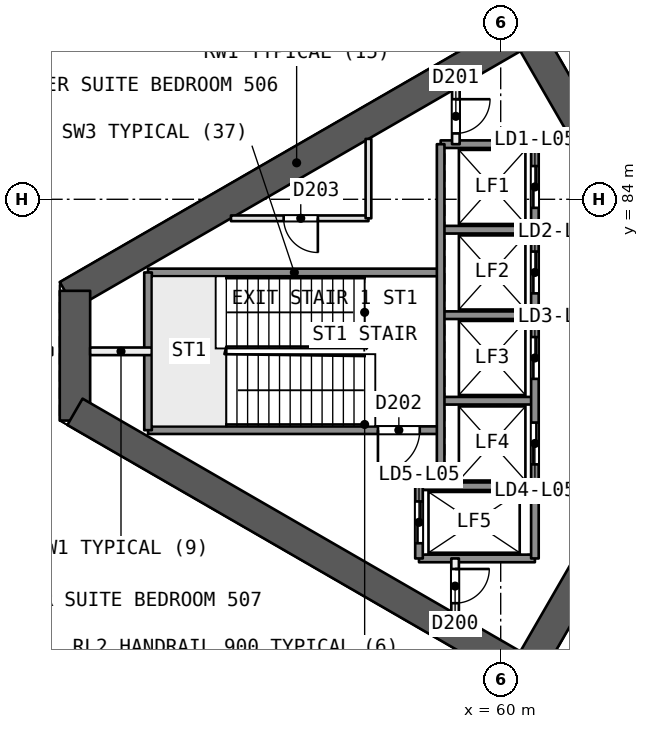
"""IFC4 building model, lengths in metres.
Left out: names, types, materials, properties, quantities, classifications, styles, units other than length and angle.
Written with IfcOpenShell. Run it as: python <this file> out.ifc"""

import sys

from ifc_helpers import new_model, si_unit, direction, frame, frame_2d, origin, place, context, subcontext, project, spatial, rectangle, extrude, element, fill, save


model = new_model("IFC4")
c1 = context("Model", 3, precision=1e-05, world=origin(), true_north=direction((0.0, 1.0)))
c2 = subcontext(c1, "Body", "Model", "MODEL_VIEW")
j1 = project(units=[si_unit("LENGTHUNIT", "METRE"), si_unit("PLANEANGLEUNIT", "RADIAN")], contexts=[c1])
p1 = place(None, origin())
s1 = spatial("IfcSite", under=j1, at=p1, CompositionType="ELEMENT")
p2 = place(p1, origin())
s2 = spatial("IfcBuilding", under=s1, at=p2, CompositionType="ELEMENT")
p3 = place(p2, frame((0.0, 0.0, 30.0)))
s3 = spatial("IfcBuildingStorey", under=s2, at=p3, CompositionType="ELEMENT", Elevation=30.0)
p4 = place(p3, frame((65.538, 80.0, 0.0), z_axis=(0.0, 0.0, 1.0), x_axis=(-0.49999662545, 0.866027352073, 0.0)))
e1 = element("IfcWall", 1, at=p4, inside=s3, PredefinedType="SHEAR", context=c2, shape_type="SweptSolid", body=[
    extrude(rectangle(XDim=10.149, YDim=0.8, at=frame_2d((5.074, 0.0))), origin(), (0.0, 0.0, 1.0), 3.7),
])
p5 = place(p4, frame((0.719, 0.0, 0.0)))
e2 = element("IfcOpeningElement", 2, at=p5, cuts=e1, PredefinedType="OPENING", context=c2, shape_type="SweptSolid", body=[
    extrude(rectangle(XDim=1.2, YDim=2.1, at=frame_2d((0.6, 1.05))), frame((0.0, 0.411, 0.0), z_axis=(0.0, -1.0, 0.0), x_axis=(1.0, 0.0, 0.0)), (0.0, 0.0, 1.0), 0.821),
])
p6 = place(p3, frame((60.664, 88.443, 0.0), z_axis=(0.0, 0.0, 1.0), x_axis=(-0.866029478545, -0.499992942241, 0.0)))
e3 = element("IfcWall", 3, at=p6, inside=s3, PredefinedType="SHEAR", context=c2, shape_type="SweptSolid", body=[
    extrude(rectangle(XDim=13.933, YDim=0.8, at=frame_2d((6.967, 0.0))), origin(), (0.0, 0.0, 1.0), 3.7),
])
p7 = place(p3, frame((48.797, 81.592, 0.0), z_axis=(0.0, 0.0, 1.0), x_axis=(0.0, -1.0, 0.0)))
e4 = element("IfcWall", 4, at=p7, inside=s3, PredefinedType="SHEAR", context=c2, shape_type="SweptSolid", body=[
    extrude(rectangle(XDim=3.415, YDim=0.8, at=frame_2d((1.707, 0.0))), origin(), (0.0, 0.0, 1.0), 3.7),
])
p8 = place(p3, frame((48.797, 78.408, 0.0), z_axis=(0.0, 0.0, 1.0), x_axis=(0.866032504327, -0.499987701298, 0.0)))
e5 = element("IfcWall", 5, at=p8, inside=s3, PredefinedType="SHEAR", context=c2, shape_type="SweptSolid", body=[
    extrude(rectangle(XDim=14.102, YDim=0.8, at=frame_2d((7.051, 0.0))), origin(), (0.0, 0.0, 1.0), 3.7),
])
p9 = place(p3, frame((60.664, 71.557, 0.0), z_axis=(0.0, 0.0, 1.0), x_axis=(0.50000409368, 0.866023040284, 0.0)))
e6 = element("IfcWall", 6, at=p9, inside=s3, PredefinedType="SHEAR", context=c2, shape_type="SweptSolid", body=[
    extrude(rectangle(XDim=9.98, YDim=0.8, at=frame_2d((4.99, 0.0))), origin(), (0.0, 0.0, 1.0), 3.7),
])
p10 = place(p9, frame((7.83, 0.0, 0.0)))
e7 = element("IfcOpeningElement", 7, at=p10, cuts=e6, PredefinedType="OPENING", context=c2, shape_type="SweptSolid", body=[
    extrude(rectangle(XDim=1.2, YDim=2.1, at=frame_2d((0.6, 1.05))), frame((0.0, 0.411, 0.0), z_axis=(0.0, -1.0, 0.0), x_axis=(1.0, 0.0, 0.0)), (0.0, 0.0, 1.0), 0.821),
])
p11 = place(p3, frame((61.625, 96.932, 0.0), z_axis=(0.0, 0.0, 1.0), x_axis=(0.499997291418, -0.866026967579, 0.0)))
e8 = element("IfcWall", 8, at=p11, inside=s3, PredefinedType="PARTITIONING", context=c2, shape_type="SweptSolid", body=[
    extrude(rectangle(XDim=14.251, YDim=0.2, at=frame_2d((7.125, 0.0))), origin(), (0.0, 0.0, 1.0), 3.2),
])
p12 = place(p3, frame((37.628, 80.0, 0.0), z_axis=(0.0, 0.0, 1.0), x_axis=(1.0, 0.0, 0.0)))
e9 = element("IfcWall", 9, at=p12, inside=s3, PredefinedType="PARTITIONING", context=c2, shape_type="SweptSolid", body=[
    extrude(rectangle(XDim=10.57, YDim=0.2, at=frame_2d((5.285, 0.0))), origin(), (0.0, 0.0, 1.0), 3.2),
])
p13 = place(p3, frame((61.625, 63.068, 0.0), z_axis=(0.0, 0.0, 1.0), x_axis=(0.499997291418, 0.866026967579, 0.0)))
e10 = element("IfcWall", 10, at=p13, inside=s3, PredefinedType="PARTITIONING", context=c2, shape_type="SweptSolid", body=[
    extrude(rectangle(XDim=14.251, YDim=0.2, at=frame_2d((7.125, 0.0))), origin(), (0.0, 0.0, 1.0), 3.2),
])
p14 = place(p3, frame((37.479, 83.163, 0.0), z_axis=(0.0, 0.0, 1.0), x_axis=(0.866024340432, 0.500001841776, 0.0)))
e11 = element("IfcWall", 11, at=p14, inside=s3, PredefinedType="SOLIDWALL", context=c2, shape_type="SweptSolid", body=[
    extrude(rectangle(XDim=61.824, YDim=0.3, at=frame_2d((30.912, 0.0))), origin(), (0.0, 0.0, 1.0), 3.2),
])
p15 = place(p14, frame((29.556, 0.0, 0.0)))
e12 = element("IfcOpeningElement", 12, at=p15, cuts=e11, PredefinedType="OPENING", context=c2, shape_type="SweptSolid", body=[
    extrude(rectangle(XDim=2.4, YDim=2.4, at=frame_2d((1.2, 1.2))), frame((0.0, 0.161, 0.0), z_axis=(0.0, -1.0, 0.0), x_axis=(1.0, 0.0, 0.0)), (0.0, 0.0, 1.0), 0.321),
])
p16 = place(p14, frame((35.012, 0.0, 0.0)))
e13 = element("IfcOpeningElement", 13, at=p16, cuts=e11, PredefinedType="OPENING", context=c2, shape_type="SweptSolid", body=[
    extrude(rectangle(XDim=2.4, YDim=2.4, at=frame_2d((1.2, 1.2))), frame((0.0, 0.161, 0.0), z_axis=(0.0, -1.0, 0.0), x_axis=(1.0, 0.0, 0.0)), (0.0, 0.0, 1.0), 0.321),
])
p17 = place(p14, frame((47.93, 0.0, 0.0)))
e14 = element("IfcOpeningElement", 14, at=p17, cuts=e11, PredefinedType="OPENING", context=c2, shape_type="SweptSolid", body=[
    extrude(rectangle(XDim=2.4, YDim=2.4, at=frame_2d((1.2, 1.2))), frame((0.0, 0.161, 0.0), z_axis=(0.0, -1.0, 0.0), x_axis=(1.0, 0.0, 0.0)), (0.0, 0.0, 1.0), 0.321),
])
p18 = place(p14, frame((24.256, 0.0, 0.0)))
e15 = element("IfcOpeningElement", 15, at=p18, cuts=e11, PredefinedType="OPENING", context=c2, shape_type="SweptSolid", body=[
    extrude(rectangle(XDim=2.4, YDim=2.4, at=frame_2d((1.2, 1.2))), frame((0.0, 0.161, 0.0), z_axis=(0.0, -1.0, 0.0), x_axis=(1.0, 0.0, 0.0)), (0.0, 0.0, 1.0), 0.321),
])
p19 = place(p14, frame((11.509, 0.0, 0.0)))
e16 = element("IfcOpeningElement", 16, at=p19, cuts=e11, PredefinedType="OPENING", context=c2, shape_type="SweptSolid", body=[
    extrude(rectangle(XDim=2.4, YDim=2.4, at=frame_2d((1.2, 1.2))), frame((0.0, 0.161, 0.0), z_axis=(0.0, -1.0, 0.0), x_axis=(1.0, 0.0, 0.0)), (0.0, 0.0, 1.0), 0.321),
])
p20 = place(p3, frame((91.021, 45.924, 0.0), z_axis=(0.0, 0.0, 1.0), x_axis=(-0.866024340432, 0.500001841776, 0.0)))
e17 = element("IfcWall", 17, at=p20, inside=s3, PredefinedType="SOLIDWALL", context=c2, shape_type="SweptSolid", body=[
    extrude(rectangle(XDim=61.824, YDim=0.3, at=frame_2d((30.912, 0.0))), origin(), (0.0, 0.0, 1.0), 3.2),
])
p21 = place(p20, frame((35.168, 0.0, 0.0)))
e18 = element("IfcOpeningElement", 18, at=p21, cuts=e17, PredefinedType="OPENING", context=c2, shape_type="SweptSolid", body=[
    extrude(rectangle(XDim=2.4, YDim=2.4, at=frame_2d((1.2, 1.2))), frame((0.0, 0.161, 0.0), z_axis=(0.0, -1.0, 0.0), x_axis=(1.0, 0.0, 0.0)), (0.0, 0.0, 1.0), 0.321),
])
p22 = place(p20, frame((47.93, 0.0, 0.0)))
e19 = element("IfcOpeningElement", 19, at=p22, cuts=e17, PredefinedType="OPENING", context=c2, shape_type="SweptSolid", body=[
    extrude(rectangle(XDim=2.4, YDim=2.4, at=frame_2d((1.2, 1.2))), frame((0.0, 0.161, 0.0), z_axis=(0.0, -1.0, 0.0), x_axis=(1.0, 0.0, 0.0)), (0.0, 0.0, 1.0), 0.321),
])
p23 = place(p20, frame((24.724, 0.0, 0.0)))
e20 = element("IfcOpeningElement", 20, at=p23, cuts=e17, PredefinedType="OPENING", context=c2, shape_type="SweptSolid", body=[
    extrude(rectangle(XDim=2.4, YDim=2.4, at=frame_2d((1.2, 1.2))), frame((0.0, 0.161, 0.0), z_axis=(0.0, -1.0, 0.0), x_axis=(1.0, 0.0, 0.0)), (0.0, 0.0, 1.0), 0.321),
])
p24 = place(p20, frame((11.509, 0.0, 0.0)))
e21 = element("IfcOpeningElement", 21, at=p24, cuts=e17, PredefinedType="OPENING", context=c2, shape_type="SweptSolid", body=[
    extrude(rectangle(XDim=2.4, YDim=2.4, at=frame_2d((1.2, 1.2))), frame((0.0, 0.161, 0.0), z_axis=(0.0, -1.0, 0.0), x_axis=(1.0, 0.0, 0.0)), (0.0, 0.0, 1.0), 0.321),
])
p25 = place(p20, frame((31.805, 0.0, 0.9)))
e22 = element("IfcOpeningElement", 22, at=p25, cuts=e17, PredefinedType="OPENING", context=c2, shape_type="SweptSolid", body=[
    extrude(rectangle(XDim=1.8, YDim=1.5, at=frame_2d((0.9, 0.75))), frame((0.0, 0.161, 0.0), z_axis=(0.0, -1.0, 0.0), x_axis=(1.0, 0.0, 0.0)), (0.0, 0.0, 1.0), 0.321),
])
p26 = place(p20, frame((29.155, 0.0, 0.9)))
e23 = element("IfcOpeningElement", 23, at=p26, cuts=e17, PredefinedType="OPENING", context=c2, shape_type="SweptSolid", body=[
    extrude(rectangle(XDim=1.8, YDim=1.5, at=frame_2d((0.9, 0.75))), frame((0.0, 0.161, 0.0), z_axis=(0.0, -1.0, 0.0), x_axis=(1.0, 0.0, 0.0)), (0.0, 0.0, 1.0), 0.321),
])
p27 = place(p3, frame((60.9, 85.45, 0.0), z_axis=(0.0, 0.0, 1.0), x_axis=(-1.0, 0.0, 0.0)))
e24 = element("IfcWall", 24, at=p27, inside=s3, PredefinedType="SOLIDWALL", context=c2, shape_type="SweptSolid", body=[
    extrude(rectangle(XDim=2.48, YDim=0.2, at=frame_2d((1.24, 0.0))), origin(), (0.0, 0.0, 1.0), 3.2),
])
p28 = place(p3, frame((56.52, 83.5, 0.0), z_axis=(0.0, 0.0, 1.0), x_axis=(-1.0, 0.0, 0.0)))
e25 = element("IfcWall", 25, at=p28, inside=s3, PredefinedType="PARTITIONING", context=c2, shape_type="SweptSolid", body=[
    extrude(rectangle(XDim=3.618, YDim=0.15, at=frame_2d((1.809, 0.0))), origin(), (0.0, 0.0, 1.0), 3.2),
])
p29 = place(p28, frame((1.332, 0.0, 0.0)))
e26 = element("IfcOpeningElement", 26, at=p29, cuts=e25, PredefinedType="OPENING", context=c2, shape_type="SweptSolid", body=[
    extrude(rectangle(XDim=0.9, YDim=2.1, at=frame_2d((0.45, 1.05))), frame((0.0, 0.085, 0.0), z_axis=(0.0, -1.0, 0.0), x_axis=(1.0, 0.0, 0.0)), (0.0, 0.0, 1.0), 0.171),
])
p30 = place(p3, frame((60.9, 83.2, 0.0), z_axis=(0.0, 0.0, 1.0), x_axis=(-1.0, 0.0, 0.0)))
e27 = element("IfcWall", 27, at=p30, inside=s3, PredefinedType="SOLIDWALL", context=c2, shape_type="SweptSolid", body=[
    extrude(rectangle(XDim=2.48, YDim=0.2, at=frame_2d((1.24, 0.0))), origin(), (0.0, 0.0, 1.0), 3.2),
])
p31 = place(p3, frame((58.42, 82.075, 0.0), z_axis=(0.0, 0.0, 1.0), x_axis=(-1.0, 0.0, 0.0)))
e28 = element("IfcWall", 28, at=p31, inside=s3, PredefinedType="SOLIDWALL", context=c2, shape_type="SweptSolid", body=[
    extrude(rectangle(XDim=7.7, YDim=0.2, at=frame_2d((3.85, 0.0))), origin(), (0.0, 0.0, 1.0), 3.2),
])
p32 = place(p3, frame((60.9, 80.95, 0.0), z_axis=(0.0, 0.0, 1.0), x_axis=(-1.0, 0.0, 0.0)))
e29 = element("IfcWall", 29, at=p32, inside=s3, PredefinedType="SOLIDWALL", context=c2, shape_type="SweptSolid", body=[
    extrude(rectangle(XDim=2.48, YDim=0.2, at=frame_2d((1.24, 0.0))), origin(), (0.0, 0.0, 1.0), 3.2),
])
p33 = place(p3, frame((50.82, 80.0, 0.0), z_axis=(0.0, 0.0, 1.0), x_axis=(-1.0, 0.0, 0.0)))
e30 = element("IfcWall", 30, at=p33, inside=s3, PredefinedType="PARTITIONING", context=c2, shape_type="SweptSolid", body=[
    extrude(rectangle(XDim=1.623, YDim=0.2, at=frame_2d((0.812, 0.0))), origin(), (0.0, 0.0, 1.0), 3.2),
])
p34 = place(p3, frame((60.9, 78.7, 0.0), z_axis=(0.0, 0.0, 1.0), x_axis=(-1.0, 0.0, 0.0)))
e31 = element("IfcWall", 31, at=p34, inside=s3, PredefinedType="SOLIDWALL", context=c2, shape_type="SweptSolid", body=[
    extrude(rectangle(XDim=2.48, YDim=0.2, at=frame_2d((1.24, 0.0))), origin(), (0.0, 0.0, 1.0), 3.2),
])
p35 = place(p3, frame((58.42, 77.925, 0.0), z_axis=(0.0, 0.0, 1.0), x_axis=(-1.0, 0.0, 0.0)))
e32 = element("IfcWall", 32, at=p35, inside=s3, PredefinedType="SOLIDWALL", context=c2, shape_type="SweptSolid", body=[
    extrude(rectangle(XDim=7.7, YDim=0.2, at=frame_2d((3.85, 0.0))), origin(), (0.0, 0.0, 1.0), 3.2),
])
p36 = place(p35, frame((0.55, 0.0, 0.0)))
e33 = element("IfcOpeningElement", 33, at=p36, cuts=e32, PredefinedType="OPENING", context=c2, shape_type="SweptSolid", body=[
    extrude(rectangle(XDim=1.1, YDim=2.1, at=frame_2d((0.55, 1.05))), frame((0.0, 0.11, 0.0), z_axis=(0.0, -1.0, 0.0), x_axis=(1.0, 0.0, 0.0)), (0.0, 0.0, 1.0), 0.221),
])
for number, where, z_axis, x_axis in (
    (34, (60.9, 76.45, 0.0), (0.0, 0.0, 1.0), (-1.0, 0.0, 0.0)),
    (35, (60.9, 74.55, 0.0), (0.0, 0.0, 1.0), (-1.0, 0.0, 0.0)),
):
    element("IfcWall", number, at=place(p3, frame(where, z_axis=z_axis, x_axis=x_axis)), inside=s3, PredefinedType="SOLIDWALL", context=c2, shape_type="SweptSolid", body=[
        extrude(rectangle(XDim=3.05, YDim=0.2, at=frame_2d((1.525, 0.0))), origin(), (0.0, 0.0, 1.0), 3.2),
    ])
p37 = place(p3, frame((60.9, 85.45, 0.0), z_axis=(0.0, 0.0, 1.0), x_axis=(0.0, -1.0, 0.0)))
e36 = element("IfcWall", 36, at=p37, inside=s3, PredefinedType="SOLIDWALL", context=c2, shape_type="SweptSolid", body=[
    extrude(rectangle(XDim=10.9, YDim=0.2, at=frame_2d((5.45, 0.0))), origin(), (0.0, 0.0, 1.0), 3.2),
])
p38 = place(p37, frame((0.575, 0.0, 0.0)))
e37 = element("IfcOpeningElement", 37, at=p38, cuts=e36, PredefinedType="OPENING", context=c2, shape_type="SweptSolid", body=[
    extrude(rectangle(XDim=1.1, YDim=2.1, at=frame_2d((0.55, 1.05))), frame((0.0, 0.11, 0.0), z_axis=(0.0, -1.0, 0.0), x_axis=(1.0, 0.0, 0.0)), (0.0, 0.0, 1.0), 0.221),
])
p39 = place(p37, frame((2.825, 0.0, 0.0)))
e38 = element("IfcOpeningElement", 38, at=p39, cuts=e36, PredefinedType="OPENING", context=c2, shape_type="SweptSolid", body=[
    extrude(rectangle(XDim=1.1, YDim=2.1, at=frame_2d((0.55, 1.05))), frame((0.0, 0.11, 0.0), z_axis=(0.0, -1.0, 0.0), x_axis=(1.0, 0.0, 0.0)), (0.0, 0.0, 1.0), 0.221),
])
p40 = place(p37, frame((5.075, 0.0, 0.0)))
e39 = element("IfcOpeningElement", 39, at=p40, cuts=e36, PredefinedType="OPENING", context=c2, shape_type="SweptSolid", body=[
    extrude(rectangle(XDim=1.1, YDim=2.1, at=frame_2d((0.55, 1.05))), frame((0.0, 0.11, 0.0), z_axis=(0.0, -1.0, 0.0), x_axis=(1.0, 0.0, 0.0)), (0.0, 0.0, 1.0), 0.221),
])
p41 = place(p37, frame((7.325, 0.0, 0.0)))
e40 = element("IfcOpeningElement", 40, at=p41, cuts=e36, PredefinedType="OPENING", context=c2, shape_type="SweptSolid", body=[
    extrude(rectangle(XDim=1.1, YDim=2.1, at=frame_2d((0.55, 1.05))), frame((0.0, 0.11, 0.0), z_axis=(0.0, -1.0, 0.0), x_axis=(1.0, 0.0, 0.0)), (0.0, 0.0, 1.0), 0.221),
])
p42 = place(p3, frame((58.82, 86.917, 0.0), z_axis=(0.0, 0.0, 1.0), x_axis=(0.0, -1.0, 0.0)))
e41 = element("IfcWall", 41, at=p42, inside=s3, PredefinedType="PARTITIONING", context=c2, shape_type="SweptSolid", body=[
    extrude(rectangle(XDim=1.467, YDim=0.2, at=frame_2d((0.733, 0.0))), origin(), (0.0, 0.0, 1.0), 3.2),
])
p43 = place(p42, frame((0.283, 0.0, 0.0)))
e42 = element("IfcOpeningElement", 42, at=p43, cuts=e41, PredefinedType="OPENING", context=c2, shape_type="SweptSolid", body=[
    extrude(rectangle(XDim=0.9, YDim=2.1, at=frame_2d((0.45, 1.05))), frame((0.0, 0.11, 0.0), z_axis=(0.0, -1.0, 0.0), x_axis=(1.0, 0.0, 0.0)), (0.0, 0.0, 1.0), 0.221),
])
p44 = place(p3, frame((58.8, 74.55, 0.0), z_axis=(0.0, 0.0, 1.0), x_axis=(0.0, -1.0, 0.0)))
e43 = element("IfcWall", 43, at=p44, inside=s3, PredefinedType="PARTITIONING", context=c2, shape_type="SweptSolid", body=[
    extrude(rectangle(XDim=1.455, YDim=0.2, at=frame_2d((0.728, 0.0))), origin(), (0.0, 0.0, 1.0), 3.2),
])
p45 = place(p44, frame((0.278, 0.0, 0.0)))
e44 = element("IfcOpeningElement", 44, at=p45, cuts=e43, PredefinedType="OPENING", context=c2, shape_type="SweptSolid", body=[
    extrude(rectangle(XDim=0.9, YDim=2.1, at=frame_2d((0.45, 1.05))), frame((0.0, 0.11, 0.0), z_axis=(0.0, -1.0, 0.0), x_axis=(1.0, 0.0, 0.0)), (0.0, 0.0, 1.0), 0.221),
])
p46 = place(p3, frame((58.42, 85.45, 0.0), z_axis=(0.0, 0.0, 1.0), x_axis=(0.0, -1.0, 0.0)))
e45 = element("IfcWall", 45, at=p46, inside=s3, PredefinedType="SOLIDWALL", context=c2, shape_type="SweptSolid", body=[
    extrude(rectangle(XDim=9.0, YDim=0.2, at=frame_2d((4.5, 0.0))), origin(), (0.0, 0.0, 1.0), 3.2),
])
p47 = place(p3, frame((57.85, 76.45, 0.0), z_axis=(0.0, 0.0, 1.0), x_axis=(0.0, -1.0, 0.0)))
e46 = element("IfcWall", 46, at=p47, inside=s3, PredefinedType="SOLIDWALL", context=c2, shape_type="SweptSolid", body=[
    extrude(rectangle(XDim=1.9, YDim=0.2, at=frame_2d((0.95, 0.0))), origin(), (0.0, 0.0, 1.0), 3.2),
])
p48 = place(p47, frame((0.4, 0.0, 0.0)))
e47 = element("IfcOpeningElement", 47, at=p48, cuts=e46, PredefinedType="OPENING", context=c2, shape_type="SweptSolid", body=[
    extrude(rectangle(XDim=1.1, YDim=2.1, at=frame_2d((0.55, 1.05))), frame((0.0, 0.11, 0.0), z_axis=(0.0, -1.0, 0.0), x_axis=(1.0, 0.0, 0.0)), (0.0, 0.0, 1.0), 0.221),
])
p49 = place(p3, frame((56.52, 85.589, 0.0), z_axis=(0.0, 0.0, 1.0), x_axis=(0.0, -1.0, 0.0)))
e48 = element("IfcWall", 48, at=p49, inside=s3, PredefinedType="PARTITIONING", context=c2, shape_type="SweptSolid", body=[
    extrude(rectangle(XDim=2.089, YDim=0.15, at=frame_2d((1.044, 0.0))), origin(), (0.0, 0.0, 1.0), 3.2),
])
p50 = place(p3, frame((50.72, 82.075, 0.0), z_axis=(0.0, 0.0, 1.0), x_axis=(0.0, -1.0, 0.0)))
e49 = element("IfcWall", 49, at=p50, inside=s3, PredefinedType="SOLIDWALL", context=c2, shape_type="SweptSolid", body=[
    extrude(rectangle(XDim=4.15, YDim=0.2, at=frame_2d((2.075, 0.0))), origin(), (0.0, 0.0, 1.0), 3.2),
])
p51 = place(p38, origin())
e50 = element("IfcDoor", 50, at=p51, inside=s3, OperationType="SLIDING_TO_RIGHT", PredefinedType="NOTDEFINED", context=c2, shape_type="SweptSolid", body=[
    extrude(rectangle(XDim=1.1, YDim=2.1, at=frame_2d((0.55, 1.05))), frame((0.0, 0.025, 0.0), z_axis=(0.0, -1.0, 0.0), x_axis=(1.0, 0.0, 0.0)), (0.0, 0.0, 1.0), 0.05),
])
fill(e37, e50)
p52 = place(p39, origin())
e51 = element("IfcDoor", 51, at=p52, inside=s3, OperationType="SLIDING_TO_LEFT", PredefinedType="NOTDEFINED", context=c2, shape_type="SweptSolid", body=[
    extrude(rectangle(XDim=1.1, YDim=2.1, at=frame_2d((0.55, 1.05))), frame((0.0, 0.025, 0.0), z_axis=(0.0, -1.0, 0.0), x_axis=(1.0, 0.0, 0.0)), (0.0, 0.0, 1.0), 0.05),
])
fill(e38, e51)
p53 = place(p40, origin())
e52 = element("IfcDoor", 52, at=p53, inside=s3, OperationType="SLIDING_TO_RIGHT", PredefinedType="NOTDEFINED", context=c2, shape_type="SweptSolid", body=[
    extrude(rectangle(XDim=1.1, YDim=2.1, at=frame_2d((0.55, 1.05))), frame((0.0, 0.025, 0.0), z_axis=(0.0, -1.0, 0.0), x_axis=(1.0, 0.0, 0.0)), (0.0, 0.0, 1.0), 0.05),
])
fill(e39, e52)
p54 = place(p41, origin())
e53 = element("IfcDoor", 53, at=p54, inside=s3, OperationType="SLIDING_TO_LEFT", PredefinedType="NOTDEFINED", context=c2, shape_type="SweptSolid", body=[
    extrude(rectangle(XDim=1.1, YDim=2.1, at=frame_2d((0.55, 1.05))), frame((0.0, 0.025, 0.0), z_axis=(0.0, -1.0, 0.0), x_axis=(1.0, 0.0, 0.0)), (0.0, 0.0, 1.0), 0.05),
])
fill(e40, e53)
p55 = place(p48, origin())
e54 = element("IfcDoor", 54, at=p55, inside=s3, OperationType="SLIDING_TO_RIGHT", PredefinedType="NOTDEFINED", context=c2, shape_type="SweptSolid", body=[
    extrude(rectangle(XDim=1.1, YDim=2.1, at=frame_2d((0.55, 1.05))), frame((0.0, 0.025, 0.0), z_axis=(0.0, -1.0, 0.0), x_axis=(1.0, 0.0, 0.0)), (0.0, 0.0, 1.0), 0.05),
])
fill(e47, e54)
p56 = place(p45, origin())
e55 = element("IfcDoor", 55, at=p56, inside=s3, OperationType="SINGLE_SWING_LEFT", PredefinedType="NOTDEFINED", context=c2, shape_type="SweptSolid", body=[
    extrude(rectangle(XDim=0.9, YDim=2.1, at=frame_2d((0.45, 1.05))), frame((0.0, 0.025, 0.0), z_axis=(0.0, -1.0, 0.0), x_axis=(1.0, 0.0, 0.0)), (0.0, 0.0, 1.0), 0.05),
])
fill(e44, e55)
p57 = place(p43, origin())
e56 = element("IfcDoor", 56, at=p57, inside=s3, OperationType="SINGLE_SWING_LEFT", PredefinedType="NOTDEFINED", context=c2, shape_type="SweptSolid", body=[
    extrude(rectangle(XDim=0.9, YDim=2.1, at=frame_2d((0.45, 1.05))), frame((0.0, 0.025, 0.0), z_axis=(0.0, -1.0, 0.0), x_axis=(1.0, 0.0, 0.0)), (0.0, 0.0, 1.0), 0.05),
])
fill(e42, e56)
p58 = place(p36, origin())
e57 = element("IfcDoor", 57, at=p58, inside=s3, OperationType="SINGLE_SWING_RIGHT", PredefinedType="NOTDEFINED", context=c2, shape_type="SweptSolid", body=[
    extrude(rectangle(XDim=1.1, YDim=2.1, at=frame_2d((0.55, 1.05))), frame((0.0, 0.025, 0.0), z_axis=(0.0, -1.0, 0.0), x_axis=(1.0, 0.0, 0.0)), (0.0, 0.0, 1.0), 0.05),
])
fill(e33, e57)
p59 = place(p29, origin())
e58 = element("IfcDoor", 58, at=p59, inside=s3, OperationType="SINGLE_SWING_LEFT", PredefinedType="NOTDEFINED", context=c2, shape_type="SweptSolid", body=[
    extrude(rectangle(XDim=0.9, YDim=2.1, at=frame_2d((0.45, 1.05))), frame((0.0, 0.025, 0.0), z_axis=(0.0, -1.0, 0.0), x_axis=(1.0, 0.0, 0.0)), (0.0, 0.0, 1.0), 0.05),
])
fill(e26, e58)
save(model, sys.argv[1])
